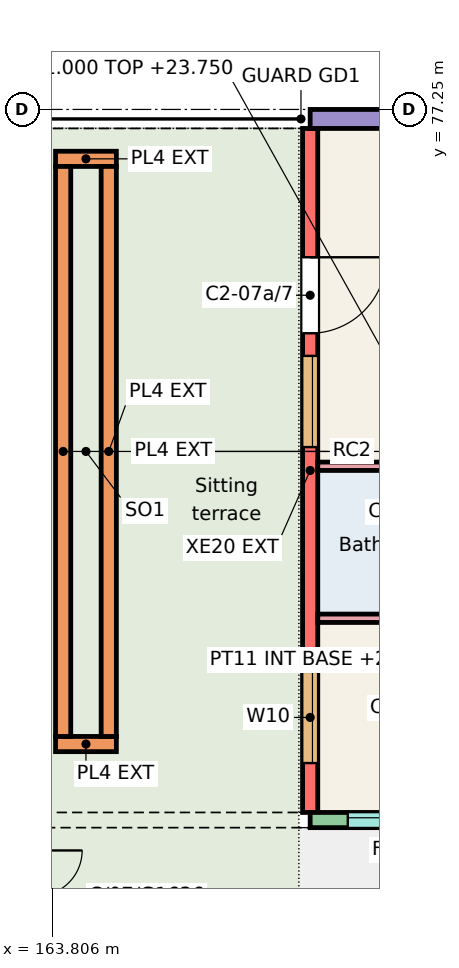
"""IFC4 building model, lengths in metres.
Left out: names, types, materials, properties, quantities, classifications, styles, units other than length and angle.
Written with IfcOpenShell. Run it as: python <this file> out.ifc"""

import sys

from ifc_helpers import new_model, si_unit, direction, frame, frame_2d, origin, place, context, subcontext, project, spatial, rectangle, extrude, element, fill, save


model = new_model("IFC4")
c1 = context("Model", 3, precision=1e-05, world=origin(), true_north=direction((0.0, 1.0)))
c2 = subcontext(c1, "Body", "Model", "MODEL_VIEW")
j1 = project(units=[si_unit("LENGTHUNIT", "METRE"), si_unit("PLANEANGLEUNIT", "RADIAN")], contexts=[c1])
p1 = place(None, origin())
s1 = spatial("IfcSite", under=j1, at=p1, CompositionType="ELEMENT")
p2 = place(p1, origin())
s2 = spatial("IfcBuilding", under=s1, at=p2, CompositionType="ELEMENT")
p3 = place(p2, frame((0.0, 0.0, 21.0)))
s3 = spatial("IfcBuildingStorey", under=s2, at=p3, CompositionType="ELEMENT", Elevation=21.0)
p4 = place(p3, frame((167.2, 68.0, 0.0), z_axis=(0.0, 0.0, 1.0), x_axis=(0.0, 1.0, 0.0)))
e1 = element("IfcWall", 1, at=p4, inside=s3, PredefinedType="SHEAR", context=c2, shape_type="SweptSolid", body=[
    extrude(rectangle(XDim=9.0, YDim=0.2, at=frame_2d((4.5, 0.0))), origin(), (0.0, 0.0, 1.0), 3.0),
])
p5 = place(p4, frame((0.65, 0.0, 0.9)))
e2 = element("IfcOpeningElement", 2, at=p5, cuts=e1, PredefinedType="OPENING", context=c2, shape_type="SweptSolid", body=[
    extrude(rectangle(XDim=1.2, YDim=1.5, at=frame_2d((0.6, 0.75))), frame((0.0, 0.11, 0.0), z_axis=(0.0, -1.0, 0.0), x_axis=(1.0, 0.0, 0.0)), (0.0, 0.0, 1.0), 0.22),
])
p6 = place(p4, frame((4.808, 0.0, 0.9)))
e3 = element("IfcOpeningElement", 3, at=p6, cuts=e1, PredefinedType="OPENING", context=c2, shape_type="SweptSolid", body=[
    extrude(rectangle(XDim=1.2, YDim=1.5, at=frame_2d((0.6, 0.75))), frame((0.0, 0.11, 0.0), z_axis=(0.0, -1.0, 0.0), x_axis=(1.0, 0.0, 0.0)), (0.0, 0.0, 1.0), 0.22),
])
p7 = place(p4, frame((6.305, 0.0, 0.0)))
e4 = element("IfcOpeningElement", 4, at=p7, cuts=e1, PredefinedType="OPENING", context=c2, shape_type="SweptSolid", body=[
    extrude(rectangle(XDim=1.0, YDim=2.1, at=frame_2d((0.5, 1.05))), frame((0.0, 0.11, 0.0), z_axis=(0.0, -1.0, 0.0), x_axis=(1.0, 0.0, 0.0)), (0.0, 0.0, 1.0), 0.22),
])
p8 = place(p3, frame((167.2, 77.125, 0.0), z_axis=(0.0, 0.0, 1.0), x_axis=(1.0, 0.0, 0.0)))
e5 = element("IfcWall", 5, at=p8, inside=s3, PredefinedType="SOLIDWALL", context=c2, shape_type="SweptSolid", body=[
    extrude(rectangle(XDim=3.6, YDim=0.25, at=frame_2d((1.8, 0.0))), origin(), (0.0, 0.0, 1.0), 3.0),
])
p9 = place(p8, frame((1.05, 0.0, 0.9)))
e6 = element("IfcOpeningElement", 6, at=p9, cuts=e5, PredefinedType="OPENING", context=c2, shape_type="SweptSolid", body=[
    extrude(rectangle(XDim=1.5, YDim=1.5, at=frame_2d((0.75, 0.75))), frame((0.0, 0.135, 0.0), z_axis=(0.0, -1.0, 0.0), x_axis=(1.0, 0.0, 0.0)), (0.0, 0.0, 1.0), 0.27),
])
p10 = place(p3, frame((167.2, 67.9, 0.0), z_axis=(0.0, 0.0, 1.0), x_axis=(1.0, 0.0, 0.0)))
e7 = element("IfcWall", 7, at=p10, inside=s3, PredefinedType="SOLIDWALL", context=c2, shape_type="SweptSolid", body=[
    extrude(rectangle(XDim=3.6, YDim=0.2, at=frame_2d((1.8, 0.0))), origin(), (0.0, 0.0, 1.0), 3.0),
])
p11 = place(p10, frame((0.495, 0.0, 1.1)))
e8 = element("IfcOpeningElement", 8, at=p11, cuts=e7, PredefinedType="OPENING", context=c2, shape_type="SweptSolid", body=[
    extrude(rectangle(XDim=1.2, YDim=1.3, at=frame_2d((0.6, 0.65))), frame((0.0, 0.11, 0.0), z_axis=(0.0, -1.0, 0.0), x_axis=(1.0, 0.0, 0.0)), (0.0, 0.0, 1.0), 0.22),
])
p12 = place(p10, frame((2.35, 0.0, 0.0)))
e9 = element("IfcOpeningElement", 9, at=p12, cuts=e7, PredefinedType="OPENING", context=c2, shape_type="SweptSolid", body=[
    extrude(rectangle(XDim=1.0, YDim=2.1, at=frame_2d((0.5, 1.05))), frame((0.0, 0.11, 0.0), z_axis=(0.0, -1.0, 0.0), x_axis=(1.0, 0.0, 0.0)), (0.0, 0.0, 1.0), 0.22),
])
for number, where, z_axis, x_axis in (
    (10, (163.85, 68.9, 0.01), (0.0, 0.0, 1.0), (1.0, 0.0, 0.0)),
    (11, (163.85, 76.6, 0.01), (0.0, 0.0, 1.0), (1.0, 0.0, 0.0)),
):
    element("IfcWall", number, at=place(p3, frame(where, z_axis=z_axis, x_axis=x_axis)), inside=s3, PredefinedType="SOLIDWALL", context=c2, shape_type="SweptSolid", body=[
        extrude(rectangle(XDim=0.8, YDim=0.2, at=frame_2d((0.4, 0.0))), origin(), (0.0, 0.0, 1.0), 0.45),
    ])
for number, where, z_axis, x_axis in (
    (12, (163.95, 69.0, 0.01), (0.0, 0.0, 1.0), (0.0, 1.0, 0.0)),
    (13, (164.55, 69.0, 0.01), (0.0, 0.0, 1.0), (0.0, 1.0, 0.0)),
):
    element("IfcWall", number, at=place(p3, frame(where, z_axis=z_axis, x_axis=x_axis)), inside=s3, PredefinedType="SOLIDWALL", context=c2, shape_type="SweptSolid", body=[
        extrude(rectangle(XDim=7.5, YDim=0.2, at=frame_2d((3.75, 0.0))), origin(), (0.0, 0.0, 1.0), 0.45),
    ])
p13 = place(p3, frame((167.3, 70.555, 0.0), z_axis=(0.0, 0.0, 1.0), x_axis=(1.0, 0.0, 0.0)))
e14 = element("IfcWall", 14, at=p13, inside=s3, PredefinedType="PARTITIONING", context=c2, shape_type="SweptSolid", body=[
    extrude(rectangle(XDim=1.99, YDim=0.11, at=frame_2d((0.995, 0.0))), origin(), (0.0, 0.0, 1.0), 2.75),
])
p14 = place(p3, frame((167.3, 72.555, 0.0), z_axis=(0.0, 0.0, 1.0), x_axis=(1.0, 0.0, 0.0)))
e15 = element("IfcWall", 15, at=p14, inside=s3, PredefinedType="PARTITIONING", context=c2, shape_type="SweptSolid", body=[
    extrude(rectangle(XDim=3.4, YDim=0.11, at=frame_2d((1.7, 0.0))), origin(), (0.0, 0.0, 1.0), 2.75),
])
p15 = place(p14, frame((2.3, 0.0, 0.0)))
e16 = element("IfcOpeningElement", 16, at=p15, cuts=e15, PredefinedType="OPENING", context=c2, shape_type="SweptSolid", body=[
    extrude(rectangle(XDim=0.9, YDim=2.1, at=frame_2d((0.45, 1.05))), frame((0.0, 0.065, 0.0), z_axis=(0.0, -1.0, 0.0), x_axis=(1.0, 0.0, 0.0)), (0.0, 0.0, 1.0), 0.13),
])
p16 = place(p11, origin())
e17 = element("IfcWindow", 17, at=p16, inside=s3, PartitioningType="SINGLE_PANEL", PredefinedType="WINDOW", context=c2, shape_type="SweptSolid", body=[
    extrude(rectangle(XDim=1.2, YDim=1.3, at=frame_2d((0.6, 0.65))), frame((0.0, 0.06, 0.0), z_axis=(0.0, -1.0, 0.0), x_axis=(1.0, 0.0, 0.0)), (0.0, 0.0, 1.0), 0.06),
])
fill(e8, e17)
p17 = place(p5, origin())
e18 = element("IfcWindow", 18, at=p17, inside=s3, PartitioningType="SINGLE_PANEL", PredefinedType="WINDOW", context=c2, shape_type="SweptSolid", body=[
    extrude(rectangle(XDim=1.2, YDim=1.5, at=frame_2d((0.6, 0.75))), frame((0.0, 0.0, 0.0), z_axis=(0.0, -1.0, 0.0), x_axis=(1.0, 0.0, 0.0)), (0.0, 0.0, 1.0), 0.06),
])
fill(e2, e18)
p18 = place(p6, origin())
e19 = element("IfcWindow", 19, at=p18, inside=s3, PartitioningType="SINGLE_PANEL", PredefinedType="WINDOW", context=c2, shape_type="SweptSolid", body=[
    extrude(rectangle(XDim=1.2, YDim=1.5, at=frame_2d((0.6, 0.75))), frame((0.0, 0.0, 0.0), z_axis=(0.0, -1.0, 0.0), x_axis=(1.0, 0.0, 0.0)), (0.0, 0.0, 1.0), 0.06),
])
fill(e3, e19)
p19 = place(p7, origin())
e20 = element("IfcDoor", 20, at=p19, inside=s3, OperationType="SINGLE_SWING_RIGHT", PredefinedType="DOOR", context=c2, shape_type="SweptSolid", body=[
    extrude(rectangle(XDim=1.0, YDim=2.1, at=frame_2d((0.5, 1.05))), frame((0.0, 0.025, 0.0), z_axis=(0.0, -1.0, 0.0), x_axis=(1.0, 0.0, 0.0)), (0.0, 0.0, 1.0), 0.05),
])
fill(e4, e20)
save(model, sys.argv[1])
